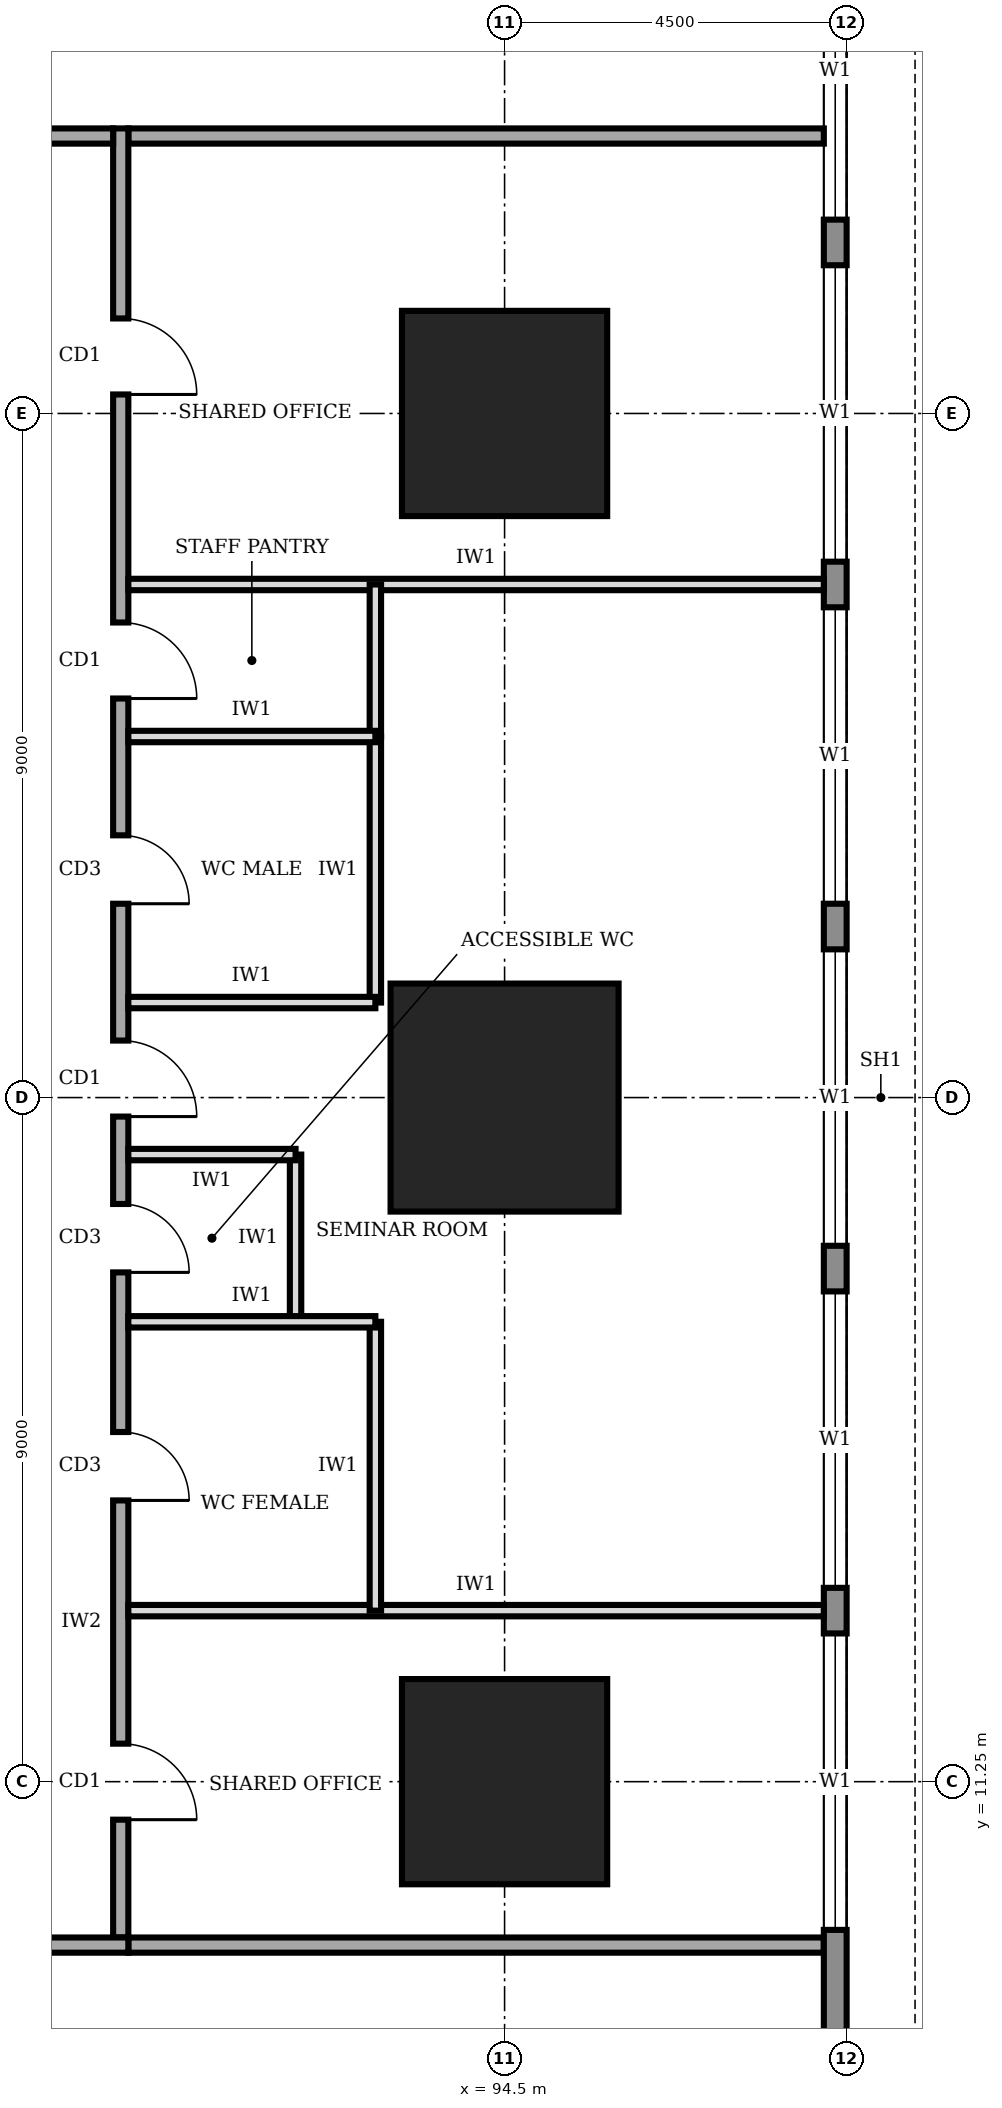
"""IFC4 building model, lengths in metres.
Left out: names, types, materials, properties, quantities, classifications, styles, units other than length and angle.
Written with IfcOpenShell. Run it as: python <this file> out.ifc"""

import sys

from ifc_helpers import new_model, si_unit, direction, frame, frame_2d, origin, origin_2d, place, context, subcontext, project, spatial, rectangle, extrude, element, fill, save


model = new_model("IFC4")
c1 = context("Model", 3, precision=1e-05, world=origin(), true_north=direction((0.0, 1.0)))
c2 = subcontext(c1, "Body", "Model", "MODEL_VIEW")
j1 = project(units=[si_unit("LENGTHUNIT", "METRE"), si_unit("PLANEANGLEUNIT", "RADIAN")], contexts=[c1])
p1 = place(None, origin())
s1 = spatial("IfcSite", under=j1, at=p1, CompositionType="ELEMENT")
p2 = place(p1, origin())
s2 = spatial("IfcBuilding", under=s1, at=p2, CompositionType="ELEMENT")
p3 = place(p2, frame((0.0, 0.0, 25.0)))
s3 = spatial("IfcBuildingStorey", under=s2, at=p3, CompositionType="ELEMENT", Elevation=25.0)
p4 = place(p3, frame((94.5, 11.25, 0.0), z_axis=(0.0, 0.0, 1.0), x_axis=(1.0, 0.0, 0.0)))
e1 = element("IfcColumn", 1, at=p4, inside=s3, PredefinedType="COLUMN", context=c2, shape_type="SweptSolid", body=[
    extrude(rectangle(XDim=2.7, YDim=2.7, at=origin_2d()), origin(), (0.0, 0.0, 1.0), 4.0),
])
p5 = place(p3, frame((94.5, 20.25, 0.0), z_axis=(0.0, 0.0, 1.0), x_axis=(1.0, 0.0, 0.0)))
e2 = element("IfcColumn", 2, at=p5, inside=s3, PredefinedType="COLUMN", context=c2, shape_type="SweptSolid", body=[
    extrude(rectangle(XDim=3.0, YDim=3.0, at=origin_2d()), origin(), (0.0, 0.0, 1.0), 4.0),
])
p6 = place(p3, frame((94.5, 29.25, 0.0), z_axis=(0.0, 0.0, 1.0), x_axis=(1.0, 0.0, 0.0)))
e3 = element("IfcColumn", 3, at=p6, inside=s3, PredefinedType="COLUMN", context=c2, shape_type="SweptSolid", body=[
    extrude(rectangle(XDim=2.7, YDim=2.7, at=origin_2d()), origin(), (0.0, 0.0, 1.0), 4.0),
])
p7 = place(p3, frame((98.85, 4.52, 0.0), z_axis=(0.0, 0.0, 1.0), x_axis=(0.0, 1.0, 0.0)))
e4 = element("IfcWall", 4, at=p7, inside=s3, PredefinedType="STANDARD", context=c2, shape_type="SweptSolid", body=[
    extrude(rectangle(XDim=31.46, YDim=0.3, at=frame_2d((15.73, 0.0))), origin(), (0.0, 0.0, 1.0), 3.75),
])
p8 = place(p7, frame((4.78, 0.0, 0.9)))
e5 = element("IfcOpeningElement", 5, at=p8, cuts=e4, PredefinedType="OPENING", context=c2, shape_type="SweptSolid", body=[
    extrude(rectangle(XDim=3.9, YDim=2.2, at=frame_2d((1.95, 1.1))), frame((0.0, 0.16, 0.0), z_axis=(0.0, -1.0, 0.0), x_axis=(1.0, 0.0, 0.0)), (0.0, 0.0, 1.0), 0.32),
])
p9 = place(p7, frame((9.28, 0.0, 0.9)))
e6 = element("IfcOpeningElement", 6, at=p9, cuts=e4, PredefinedType="OPENING", context=c2, shape_type="SweptSolid", body=[
    extrude(rectangle(XDim=3.9, YDim=2.2, at=frame_2d((1.95, 1.1))), frame((0.0, 0.16, 0.0), z_axis=(0.0, -1.0, 0.0), x_axis=(1.0, 0.0, 0.0)), (0.0, 0.0, 1.0), 0.32),
])
p10 = place(p7, frame((13.78, 0.0, 0.9)))
e7 = element("IfcOpeningElement", 7, at=p10, cuts=e4, PredefinedType="OPENING", context=c2, shape_type="SweptSolid", body=[
    extrude(rectangle(XDim=3.9, YDim=2.2, at=frame_2d((1.95, 1.1))), frame((0.0, 0.16, 0.0), z_axis=(0.0, -1.0, 0.0), x_axis=(1.0, 0.0, 0.0)), (0.0, 0.0, 1.0), 0.32),
])
p11 = place(p7, frame((18.28, 0.0, 0.9)))
e8 = element("IfcOpeningElement", 8, at=p11, cuts=e4, PredefinedType="OPENING", context=c2, shape_type="SweptSolid", body=[
    extrude(rectangle(XDim=3.9, YDim=2.2, at=frame_2d((1.95, 1.1))), frame((0.0, 0.16, 0.0), z_axis=(0.0, -1.0, 0.0), x_axis=(1.0, 0.0, 0.0)), (0.0, 0.0, 1.0), 0.32),
])
p12 = place(p7, frame((22.78, 0.0, 0.9)))
e9 = element("IfcOpeningElement", 9, at=p12, cuts=e4, PredefinedType="OPENING", context=c2, shape_type="SweptSolid", body=[
    extrude(rectangle(XDim=3.9, YDim=2.2, at=frame_2d((1.95, 1.1))), frame((0.0, 0.16, 0.0), z_axis=(0.0, -1.0, 0.0), x_axis=(1.0, 0.0, 0.0)), (0.0, 0.0, 1.0), 0.32),
])
p13 = place(p7, frame((27.28, 0.0, 0.9)))
e10 = element("IfcOpeningElement", 10, at=p13, cuts=e4, PredefinedType="OPENING", context=c2, shape_type="SweptSolid", body=[
    extrude(rectangle(XDim=3.9, YDim=2.2, at=frame_2d((1.95, 1.1))), frame((0.0, 0.16, 0.0), z_axis=(0.0, -1.0, 0.0), x_axis=(1.0, 0.0, 0.0)), (0.0, 0.0, 1.0), 0.32),
])
p14 = place(p3, frame((72.65, 9.1, 0.0), z_axis=(0.0, 0.0, 1.0), x_axis=(1.0, 0.0, 0.0)))
e11 = element("IfcWall", 11, at=p14, inside=s3, PredefinedType="SOLIDWALL", context=c2, shape_type="SweptSolid", body=[
    extrude(rectangle(XDim=16.9, YDim=0.2, at=frame_2d((8.45, 0.0))), origin(), (0.0, 0.0, 1.0), 3.75),
])
p15 = place(p14, frame((0.925, 0.0, 0.0)))
e12 = element("IfcOpeningElement", 12, at=p15, cuts=e11, PredefinedType="OPENING", context=c2, shape_type="SweptSolid", body=[
    extrude(rectangle(XDim=1.8, YDim=2.1, at=frame_2d((0.9, 1.05))), frame((0.0, 0.11, 0.0), z_axis=(0.0, -1.0, 0.0), x_axis=(1.0, 0.0, 0.0)), (0.0, 0.0, 1.0), 0.22),
])
p16 = place(p14, frame((7.85, 0.0, 0.0)))
e13 = element("IfcOpeningElement", 13, at=p16, cuts=e11, PredefinedType="OPENING", context=c2, shape_type="SweptSolid", body=[
    extrude(rectangle(XDim=1.0, YDim=2.1, at=frame_2d((0.5, 1.05))), frame((0.0, 0.11, 0.0), z_axis=(0.0, -1.0, 0.0), x_axis=(1.0, 0.0, 0.0)), (0.0, 0.0, 1.0), 0.22),
])
p17 = place(p14, frame((13.975, 0.0, 0.0)))
e14 = element("IfcOpeningElement", 14, at=p17, cuts=e11, PredefinedType="OPENING", context=c2, shape_type="SweptSolid", body=[
    extrude(rectangle(XDim=1.8, YDim=2.1, at=frame_2d((0.9, 1.05))), frame((0.0, 0.11, 0.0), z_axis=(0.0, -1.0, 0.0), x_axis=(1.0, 0.0, 0.0)), (0.0, 0.0, 1.0), 0.22),
])
p18 = place(p3, frame((89.45, 9.2, 0.0), z_axis=(0.0, 0.0, 1.0), x_axis=(0.0, 1.0, 0.0)))
e15 = element("IfcWall", 15, at=p18, inside=s3, PredefinedType="SOLIDWALL", context=c2, shape_type="SweptSolid", body=[
    extrude(rectangle(XDim=23.8, YDim=0.2, at=frame_2d((11.9, 0.0))), origin(), (0.0, 0.0, 1.0), 3.75),
])
p19 = place(p18, frame((1.55, 0.0, 0.0)))
e16 = element("IfcOpeningElement", 16, at=p19, cuts=e15, PredefinedType="OPENING", context=c2, shape_type="SweptSolid", body=[
    extrude(rectangle(XDim=1.0, YDim=2.1, at=frame_2d((0.5, 1.05))), frame((0.0, 0.11, 0.0), z_axis=(0.0, -1.0, 0.0), x_axis=(1.0, 0.0, 0.0)), (0.0, 0.0, 1.0), 0.22),
])
p20 = place(p18, frame((5.75, 0.0, 0.0)))
e17 = element("IfcOpeningElement", 17, at=p20, cuts=e15, PredefinedType="OPENING", context=c2, shape_type="SweptSolid", body=[
    extrude(rectangle(XDim=0.9, YDim=2.1, at=frame_2d((0.45, 1.05))), frame((0.0, 0.11, 0.0), z_axis=(0.0, -1.0, 0.0), x_axis=(1.0, 0.0, 0.0)), (0.0, 0.0, 1.0), 0.22),
])
p21 = place(p18, frame((8.75, 0.0, 0.0)))
e18 = element("IfcOpeningElement", 18, at=p21, cuts=e15, PredefinedType="OPENING", context=c2, shape_type="SweptSolid", body=[
    extrude(rectangle(XDim=0.9, YDim=2.1, at=frame_2d((0.45, 1.05))), frame((0.0, 0.11, 0.0), z_axis=(0.0, -1.0, 0.0), x_axis=(1.0, 0.0, 0.0)), (0.0, 0.0, 1.0), 0.22),
])
p22 = place(p18, frame((13.6, 0.0, 0.0)))
e19 = element("IfcOpeningElement", 19, at=p22, cuts=e15, PredefinedType="OPENING", context=c2, shape_type="SweptSolid", body=[
    extrude(rectangle(XDim=0.9, YDim=2.1, at=frame_2d((0.45, 1.05))), frame((0.0, 0.11, 0.0), z_axis=(0.0, -1.0, 0.0), x_axis=(1.0, 0.0, 0.0)), (0.0, 0.0, 1.0), 0.22),
])
p23 = place(p18, frame((16.3, 0.0, 0.0)))
e20 = element("IfcOpeningElement", 20, at=p23, cuts=e15, PredefinedType="OPENING", context=c2, shape_type="SweptSolid", body=[
    extrude(rectangle(XDim=1.0, YDim=2.1, at=frame_2d((0.5, 1.05))), frame((0.0, 0.11, 0.0), z_axis=(0.0, -1.0, 0.0), x_axis=(1.0, 0.0, 0.0)), (0.0, 0.0, 1.0), 0.22),
])
p24 = place(p18, frame((10.8, 0.0, 0.0)))
e21 = element("IfcOpeningElement", 21, at=p24, cuts=e15, PredefinedType="OPENING", context=c2, shape_type="SweptSolid", body=[
    extrude(rectangle(XDim=1.0, YDim=2.1, at=frame_2d((0.5, 1.05))), frame((0.0, 0.11, 0.0), z_axis=(0.0, -1.0, 0.0), x_axis=(1.0, 0.0, 0.0)), (0.0, 0.0, 1.0), 0.22),
])
p25 = place(p18, frame((20.3, 0.0, 0.0)))
e22 = element("IfcOpeningElement", 22, at=p25, cuts=e15, PredefinedType="OPENING", context=c2, shape_type="SweptSolid", body=[
    extrude(rectangle(XDim=1.0, YDim=2.1, at=frame_2d((0.5, 1.05))), frame((0.0, 0.11, 0.0), z_axis=(0.0, -1.0, 0.0), x_axis=(1.0, 0.0, 0.0)), (0.0, 0.0, 1.0), 0.22),
])
p26 = place(p3, frame((89.35, 32.9, 0.0), z_axis=(0.0, 0.0, 1.0), x_axis=(-1.0, 0.0, 0.0)))
e23 = element("IfcWall", 23, at=p26, inside=s3, PredefinedType="SOLIDWALL", context=c2, shape_type="SweptSolid", body=[
    extrude(rectangle(XDim=16.9, YDim=0.2, at=frame_2d((8.45, 0.0))), origin(), (0.0, 0.0, 1.0), 3.75),
])
p27 = place(p26, frame((14.375, 0.0, 0.0)))
e24 = element("IfcOpeningElement", 24, at=p27, cuts=e23, PredefinedType="OPENING", context=c2, shape_type="SweptSolid", body=[
    extrude(rectangle(XDim=1.0, YDim=2.1, at=frame_2d((0.5, 1.05))), frame((0.0, 0.11, 0.0), z_axis=(0.0, -1.0, 0.0), x_axis=(1.0, 0.0, 0.0)), (0.0, 0.0, 1.0), 0.22),
])
p28 = place(p26, frame((7.85, 0.0, 0.0)))
e25 = element("IfcOpeningElement", 25, at=p28, cuts=e23, PredefinedType="OPENING", context=c2, shape_type="SweptSolid", body=[
    extrude(rectangle(XDim=1.0, YDim=2.1, at=frame_2d((0.5, 1.05))), frame((0.0, 0.11, 0.0), z_axis=(0.0, -1.0, 0.0), x_axis=(1.0, 0.0, 0.0)), (0.0, 0.0, 1.0), 0.22),
])
p29 = place(p26, frame((1.325, 0.0, 0.0)))
e26 = element("IfcOpeningElement", 26, at=p29, cuts=e23, PredefinedType="OPENING", context=c2, shape_type="SweptSolid", body=[
    extrude(rectangle(XDim=1.0, YDim=2.1, at=frame_2d((0.5, 1.05))), frame((0.0, 0.11, 0.0), z_axis=(0.0, -1.0, 0.0), x_axis=(1.0, 0.0, 0.0)), (0.0, 0.0, 1.0), 0.22),
])
for number, where, z_axis, x_axis in (
    (27, (89.55, 9.1, 0.0), (0.0, 0.0, 1.0), (1.0, 0.0, 0.0)),
    (28, (89.55, 32.9, 0.0), (0.0, 0.0, 1.0), (1.0, 0.0, 0.0)),
):
    element("IfcWall", number, at=place(p3, frame(where, z_axis=z_axis, x_axis=x_axis)), inside=s3, PredefinedType="SOLIDWALL", context=c2, shape_type="SweptSolid", body=[
        extrude(rectangle(XDim=9.15, YDim=0.2, at=frame_2d((4.575, 0.0))), origin(), (0.0, 0.0, 1.0), 3.75),
    ])
for number, where, z_axis, x_axis in (
    (29, (89.55, 13.5, 0.0), (0.0, 0.0, 1.0), (1.0, 0.0, 0.0)),
    (30, (89.55, 27.0, 0.0), (0.0, 0.0, 1.0), (1.0, 0.0, 0.0)),
):
    element("IfcWall", number, at=place(p3, frame(where, z_axis=z_axis, x_axis=x_axis)), inside=s3, PredefinedType="PARTITIONING", context=c2, shape_type="SweptSolid", body=[
        extrude(rectangle(XDim=9.15, YDim=0.15, at=frame_2d((4.575, 0.0))), origin(), (0.0, 0.0, 1.0), 3.75),
    ])
p30 = place(p3, frame((89.55, 17.3, 0.0), z_axis=(0.0, 0.0, 1.0), x_axis=(1.0, 0.0, 0.0)))
e31 = element("IfcWall", 31, at=p30, inside=s3, PredefinedType="PARTITIONING", context=c2, shape_type="SweptSolid", body=[
    extrude(rectangle(XDim=3.25, YDim=0.15, at=frame_2d((1.625, 0.0))), origin(), (0.0, 0.0, 1.0), 3.75),
])
p31 = place(p3, frame((89.55, 19.5, 0.0), z_axis=(0.0, 0.0, 1.0), x_axis=(1.0, 0.0, 0.0)))
e32 = element("IfcWall", 32, at=p31, inside=s3, PredefinedType="PARTITIONING", context=c2, shape_type="SweptSolid", body=[
    extrude(rectangle(XDim=2.2, YDim=0.15, at=frame_2d((1.1, 0.0))), origin(), (0.0, 0.0, 1.0), 2.85),
])
for number, where, z_axis, x_axis in (
    (33, (89.55, 21.5, 0.0), (0.0, 0.0, 1.0), (1.0, 0.0, 0.0)),
    (34, (89.55, 25.0, 0.0), (0.0, 0.0, 1.0), (1.0, 0.0, 0.0)),
):
    element("IfcWall", number, at=place(p3, frame(where, z_axis=z_axis, x_axis=x_axis)), inside=s3, PredefinedType="PARTITIONING", context=c2, shape_type="SweptSolid", body=[
        extrude(rectangle(XDim=3.25, YDim=0.15, at=frame_2d((1.625, 0.0))), origin(), (0.0, 0.0, 1.0), 3.75),
    ])
p32 = place(p3, frame((92.8, 13.5, 0.0), z_axis=(0.0, 0.0, 1.0), x_axis=(0.0, 1.0, 0.0)))
e35 = element("IfcWall", 35, at=p32, inside=s3, PredefinedType="PARTITIONING", context=c2, shape_type="SweptSolid", body=[
    extrude(rectangle(XDim=3.8, YDim=0.15, at=frame_2d((1.9, 0.0))), origin(), (0.0, 0.0, 1.0), 3.75),
])
p33 = place(p3, frame((91.75, 17.3, 0.0), z_axis=(0.0, 0.0, 1.0), x_axis=(0.0, 1.0, 0.0)))
e36 = element("IfcWall", 36, at=p33, inside=s3, PredefinedType="PARTITIONING", context=c2, shape_type="SweptSolid", body=[
    extrude(rectangle(XDim=2.2, YDim=0.15, at=frame_2d((1.1, 0.0))), origin(), (0.0, 0.0, 1.0), 3.75),
])
p34 = place(p3, frame((92.8, 21.5, 0.0), z_axis=(0.0, 0.0, 1.0), x_axis=(0.0, 1.0, 0.0)))
e37 = element("IfcWall", 37, at=p34, inside=s3, PredefinedType="PARTITIONING", context=c2, shape_type="SweptSolid", body=[
    extrude(rectangle(XDim=3.5, YDim=0.15, at=frame_2d((1.75, 0.0))), origin(), (0.0, 0.0, 1.0), 3.75),
])
p35 = place(p3, frame((92.8, 25.0, 0.0), z_axis=(0.0, 0.0, 1.0), x_axis=(0.0, 1.0, 0.0)))
e38 = element("IfcWall", 38, at=p35, inside=s3, PredefinedType="PARTITIONING", context=c2, shape_type="SweptSolid", body=[
    extrude(rectangle(XDim=2.0, YDim=0.15, at=frame_2d((1.0, 0.0))), origin(), (0.0, 0.0, 1.0), 3.75),
])
p36 = place(p8, origin())
e39 = element("IfcWindow", 39, at=p36, inside=s3, PartitioningType="SINGLE_PANEL", PredefinedType="WINDOW", context=c2, shape_type="SweptSolid", body=[
    extrude(rectangle(XDim=3.9, YDim=2.2, at=frame_2d((1.95, 1.1))), frame((0.0, 0.03, 0.0), z_axis=(0.0, -1.0, 0.0), x_axis=(1.0, 0.0, 0.0)), (0.0, 0.0, 1.0), 0.06),
])
fill(e5, e39)
p37 = place(p9, origin())
e40 = element("IfcWindow", 40, at=p37, inside=s3, PartitioningType="SINGLE_PANEL", PredefinedType="WINDOW", context=c2, shape_type="SweptSolid", body=[
    extrude(rectangle(XDim=3.9, YDim=2.2, at=frame_2d((1.95, 1.1))), frame((0.0, 0.03, 0.0), z_axis=(0.0, -1.0, 0.0), x_axis=(1.0, 0.0, 0.0)), (0.0, 0.0, 1.0), 0.06),
])
fill(e6, e40)
p38 = place(p10, origin())
e41 = element("IfcWindow", 41, at=p38, inside=s3, PartitioningType="SINGLE_PANEL", PredefinedType="WINDOW", context=c2, shape_type="SweptSolid", body=[
    extrude(rectangle(XDim=3.9, YDim=2.2, at=frame_2d((1.95, 1.1))), frame((0.0, 0.03, 0.0), z_axis=(0.0, -1.0, 0.0), x_axis=(1.0, 0.0, 0.0)), (0.0, 0.0, 1.0), 0.06),
])
fill(e7, e41)
p39 = place(p11, origin())
e42 = element("IfcWindow", 42, at=p39, inside=s3, PartitioningType="SINGLE_PANEL", PredefinedType="WINDOW", context=c2, shape_type="SweptSolid", body=[
    extrude(rectangle(XDim=3.9, YDim=2.2, at=frame_2d((1.95, 1.1))), frame((0.0, 0.03, 0.0), z_axis=(0.0, -1.0, 0.0), x_axis=(1.0, 0.0, 0.0)), (0.0, 0.0, 1.0), 0.06),
])
fill(e8, e42)
p40 = place(p12, origin())
e43 = element("IfcWindow", 43, at=p40, inside=s3, PartitioningType="SINGLE_PANEL", PredefinedType="WINDOW", context=c2, shape_type="SweptSolid", body=[
    extrude(rectangle(XDim=3.9, YDim=2.2, at=frame_2d((1.95, 1.1))), frame((0.0, 0.03, 0.0), z_axis=(0.0, -1.0, 0.0), x_axis=(1.0, 0.0, 0.0)), (0.0, 0.0, 1.0), 0.06),
])
fill(e9, e43)
p41 = place(p13, origin())
e44 = element("IfcWindow", 44, at=p41, inside=s3, PartitioningType="SINGLE_PANEL", PredefinedType="WINDOW", context=c2, shape_type="SweptSolid", body=[
    extrude(rectangle(XDim=3.9, YDim=2.2, at=frame_2d((1.95, 1.1))), frame((0.0, 0.03, 0.0), z_axis=(0.0, -1.0, 0.0), x_axis=(1.0, 0.0, 0.0)), (0.0, 0.0, 1.0), 0.06),
])
fill(e10, e44)
p42 = place(p19, frame((1.0, 0.0, 0.0), z_axis=(0.0, 0.0, 1.0), x_axis=(-1.0, 0.0, 0.0)))
e45 = element("IfcDoor", 45, at=p42, inside=s3, OperationType="SINGLE_SWING_RIGHT", PredefinedType="DOOR", context=c2, shape_type="SweptSolid", body=[
    extrude(rectangle(XDim=1.0, YDim=2.1, at=frame_2d((0.5, 1.05))), frame((0.0, 0.025, 0.0), z_axis=(0.0, -1.0, 0.0), x_axis=(1.0, 0.0, 0.0)), (0.0, 0.0, 1.0), 0.05),
])
fill(e16, e45)
p43 = place(p20, frame((0.9, 0.0, 0.0), z_axis=(0.0, 0.0, 1.0), x_axis=(-1.0, 0.0, 0.0)))
e46 = element("IfcDoor", 46, at=p43, inside=s3, OperationType="SINGLE_SWING_RIGHT", PredefinedType="DOOR", context=c2, shape_type="SweptSolid", body=[
    extrude(rectangle(XDim=0.9, YDim=2.1, at=frame_2d((0.45, 1.05))), frame((0.0, 0.025, 0.0), z_axis=(0.0, -1.0, 0.0), x_axis=(1.0, 0.0, 0.0)), (0.0, 0.0, 1.0), 0.05),
])
fill(e17, e46)
p44 = place(p21, frame((0.9, 0.0, 0.0), z_axis=(0.0, 0.0, 1.0), x_axis=(-1.0, 0.0, 0.0)))
e47 = element("IfcDoor", 47, at=p44, inside=s3, OperationType="SINGLE_SWING_RIGHT", PredefinedType="DOOR", context=c2, shape_type="SweptSolid", body=[
    extrude(rectangle(XDim=0.9, YDim=2.1, at=frame_2d((0.45, 1.05))), frame((0.0, 0.025, 0.0), z_axis=(0.0, -1.0, 0.0), x_axis=(1.0, 0.0, 0.0)), (0.0, 0.0, 1.0), 0.05),
])
fill(e18, e47)
p45 = place(p22, frame((0.9, 0.0, 0.0), z_axis=(0.0, 0.0, 1.0), x_axis=(-1.0, 0.0, 0.0)))
e48 = element("IfcDoor", 48, at=p45, inside=s3, OperationType="SINGLE_SWING_RIGHT", PredefinedType="DOOR", context=c2, shape_type="SweptSolid", body=[
    extrude(rectangle(XDim=0.9, YDim=2.1, at=frame_2d((0.45, 1.05))), frame((0.0, 0.025, 0.0), z_axis=(0.0, -1.0, 0.0), x_axis=(1.0, 0.0, 0.0)), (0.0, 0.0, 1.0), 0.05),
])
fill(e19, e48)
p46 = place(p23, frame((1.0, 0.0, 0.0), z_axis=(0.0, 0.0, 1.0), x_axis=(-1.0, 0.0, 0.0)))
e49 = element("IfcDoor", 49, at=p46, inside=s3, OperationType="SINGLE_SWING_RIGHT", PredefinedType="DOOR", context=c2, shape_type="SweptSolid", body=[
    extrude(rectangle(XDim=1.0, YDim=2.1, at=frame_2d((0.5, 1.05))), frame((0.0, 0.025, 0.0), z_axis=(0.0, -1.0, 0.0), x_axis=(1.0, 0.0, 0.0)), (0.0, 0.0, 1.0), 0.05),
])
fill(e20, e49)
p47 = place(p24, frame((1.0, 0.0, 0.0), z_axis=(0.0, 0.0, 1.0), x_axis=(-1.0, 0.0, 0.0)))
e50 = element("IfcDoor", 50, at=p47, inside=s3, OperationType="SINGLE_SWING_RIGHT", PredefinedType="DOOR", context=c2, shape_type="SweptSolid", body=[
    extrude(rectangle(XDim=1.0, YDim=2.1, at=frame_2d((0.5, 1.05))), frame((0.0, 0.025, 0.0), z_axis=(0.0, -1.0, 0.0), x_axis=(1.0, 0.0, 0.0)), (0.0, 0.0, 1.0), 0.05),
])
fill(e21, e50)
p48 = place(p25, frame((1.0, 0.0, 0.0), z_axis=(0.0, 0.0, 1.0), x_axis=(-1.0, 0.0, 0.0)))
e51 = element("IfcDoor", 51, at=p48, inside=s3, OperationType="SINGLE_SWING_RIGHT", PredefinedType="DOOR", context=c2, shape_type="SweptSolid", body=[
    extrude(rectangle(XDim=1.0, YDim=2.1, at=frame_2d((0.5, 1.05))), frame((0.0, 0.025, 0.0), z_axis=(0.0, -1.0, 0.0), x_axis=(1.0, 0.0, 0.0)), (0.0, 0.0, 1.0), 0.05),
])
fill(e22, e51)
save(model, sys.argv[1])
